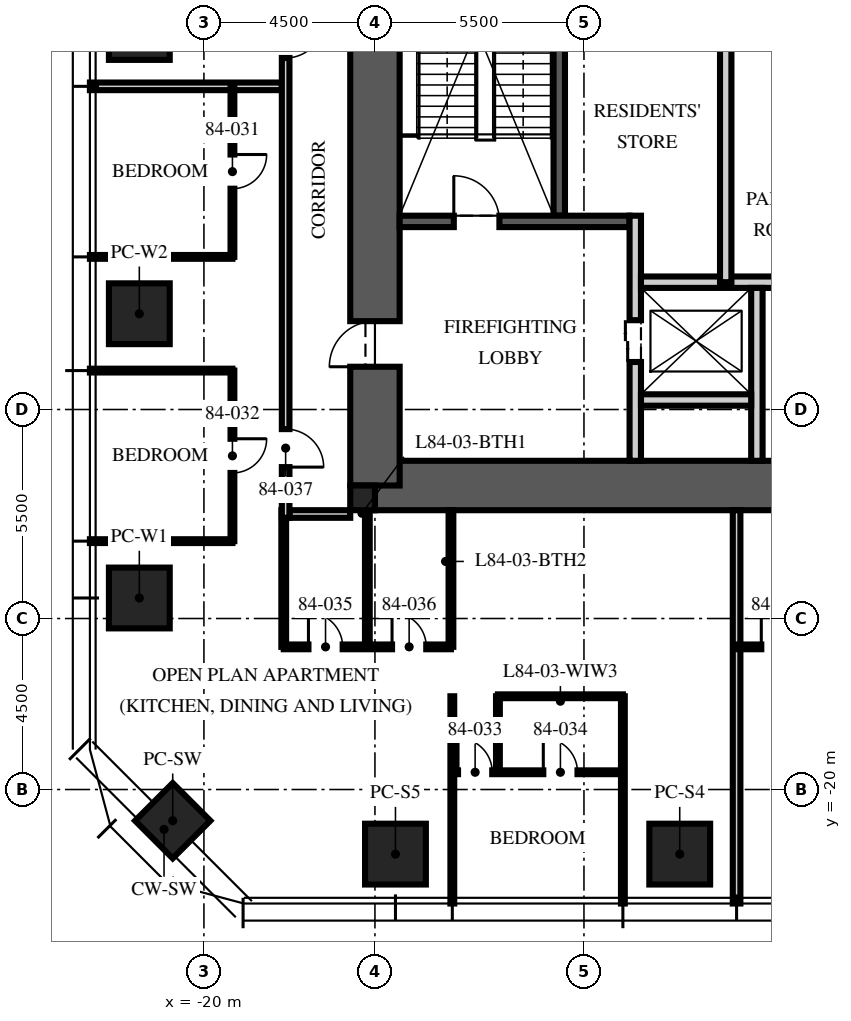
"""IFC4 building model, lengths in metres.
Left out: names, types, materials, properties, quantities, classifications, styles, units other than length and angle.
Written with IfcOpenShell. Run it as: python <this file> out.ifc"""

import sys

from ifc_helpers import new_model, si_unit, direction, frame, frame_2d, origin, origin_2d, place, context, subcontext, project, spatial, rectangle, extrude, element, fill, save


model = new_model("IFC4")
c1 = context("Model", 3, precision=1e-05, world=origin(), true_north=direction((0.0, 1.0)))
c2 = subcontext(c1, "Body", "Model", "MODEL_VIEW")
j1 = project(units=[si_unit("LENGTHUNIT", "METRE"), si_unit("PLANEANGLEUNIT", "RADIAN")], contexts=[c1])
p1 = place(None, origin())
s1 = spatial("IfcSite", under=j1, at=p1, CompositionType="ELEMENT")
p2 = place(p1, origin())
s2 = spatial("IfcBuilding", under=s1, at=p2, CompositionType="ELEMENT")
p3 = place(p2, frame((0.0, 0.0, 334.5)))
s3 = spatial("IfcBuildingStorey", under=s2, at=p3, CompositionType="ELEMENT", Elevation=334.5)
p4 = place(p3, frame((-15.5, -12.0, -0.25), z_axis=(0.0, 0.0, 1.0), x_axis=(1.0, 0.0, 0.0)))
e1 = element("IfcWall", 1, at=p4, inside=s3, PredefinedType="SHEAR", context=c2, shape_type="SweptSolid", body=[
    extrude(rectangle(XDim=31.0, YDim=1.3, at=frame_2d((15.5, 0.0))), origin(), (0.0, 0.0, 1.0), 3.75),
])
p5 = place(p3, frame((-15.5, -12.0, -0.25), z_axis=(0.0, 0.0, 1.0), x_axis=(0.0, 1.0, 0.0)))
e2 = element("IfcWall", 2, at=p5, inside=s3, PredefinedType="SHEAR", context=c2, shape_type="SweptSolid", body=[
    extrude(rectangle(XDim=24.0, YDim=1.3, at=frame_2d((12.0, 0.0))), origin(), (0.0, 0.0, 1.0), 3.75),
])
p6 = place(p5, frame((3.125, 0.0, 0.25)))
e3 = element("IfcOpeningElement", 3, at=p6, cuts=e2, PredefinedType="OPENING", context=c2, shape_type="SweptSolid", body=[
    extrude(rectangle(XDim=1.2, YDim=2.1, at=frame_2d((0.6, 1.05))), frame((0.0, 0.66, 0.0), z_axis=(0.0, -1.0, 0.0), x_axis=(1.0, 0.0, 0.0)), (0.0, 0.0, 1.0), 1.32),
])
p7 = place(p5, frame((19.375, 0.0, 0.25)))
e4 = element("IfcOpeningElement", 4, at=p7, cuts=e2, PredefinedType="OPENING", context=c2, shape_type="SweptSolid", body=[
    extrude(rectangle(XDim=1.8, YDim=2.1, at=frame_2d((0.9, 1.05))), frame((0.0, 0.66, 0.0), z_axis=(0.0, -1.0, 0.0), x_axis=(1.0, 0.0, 0.0)), (0.0, 0.0, 1.0), 1.32),
])
p8 = place(p3, frame((-15.825, -12.325, -0.25), z_axis=(0.0, 0.0, 1.0), x_axis=(1.0, 0.0, 0.0)))
e5 = element("IfcColumn", 5, at=p8, inside=s3, PredefinedType="COLUMN", context=c2, shape_type="SweptSolid", body=[
    extrude(rectangle(XDim=0.65, YDim=0.65, at=origin_2d()), origin(), (0.0, 0.0, 1.0), 3.75),
])
for number, where, z_axis, x_axis in (
    (6, (-7.48, -21.7, 0.0), (0.0, 0.0, 1.0), (1.0, 0.0, 0.0)),
    (7, (-14.96, -21.7, 0.0), (0.0, 0.0, 1.0), (1.0, 0.0, 0.0)),
    (8, (-21.7, -14.96, 0.0), (0.0, 0.0, 1.0), (0.0, 1.0, 0.0)),
    (9, (-21.7, -7.48, 0.0), (0.0, 0.0, 1.0), (0.0, 1.0, 0.0)),
    (10, (-21.7, 0.0, 0.0), (0.0, 0.0, 1.0), (0.0, 1.0, 0.0)),
):
    element("IfcColumn", number, at=place(p3, frame(where, z_axis=z_axis, x_axis=x_axis)), inside=s3, PredefinedType="COLUMN", context=c2, shape_type="SweptSolid", body=[
        extrude(rectangle(XDim=1.6, YDim=1.6, at=origin_2d()), origin(), (0.0, 0.0, 1.0), 3.75),
    ])
p9 = place(p3, frame((-20.821, -20.821, 0.0), z_axis=(0.0, 0.0, 1.0), x_axis=(0.707106781187, -0.707106781187, 0.0)))
e11 = element("IfcColumn", 11, at=p9, inside=s3, PredefinedType="COLUMN", context=c2, shape_type="SweptSolid", body=[
    extrude(rectangle(XDim=1.4, YDim=1.4, at=origin_2d()), origin(), (0.0, 0.0, 1.0), 3.75),
])
p10 = place(p3, frame((-10.65, -4.9, 0.0), z_axis=(0.0, 0.0, 1.0), x_axis=(0.0, 1.0, 0.0)))
e12 = element("IfcWall", 12, at=p10, inside=s3, PredefinedType="SOLIDWALL", context=c2, shape_type="SweptSolid", body=[
    extrude(rectangle(XDim=10.1, YDim=0.3, at=frame_2d((5.05, 0.0))), origin(), (0.0, 0.0, 1.0), 3.5),
])
p11 = place(p3, frame((-14.85, -5.05, 0.0), z_axis=(0.0, 0.0, 1.0), x_axis=(1.0, 0.0, 0.0)))
e13 = element("IfcWall", 13, at=p11, inside=s3, PredefinedType="SOLIDWALL", context=c2, shape_type="SweptSolid", body=[
    extrude(rectangle(XDim=6.05, YDim=0.3, at=frame_2d((3.025, 0.0))), origin(), (0.0, 0.0, 1.0), 3.5),
])
p12 = place(p11, frame((1.425, 0.0, 0.0)))
e14 = element("IfcOpeningElement", 14, at=p12, cuts=e13, PredefinedType="OPENING", context=c2, shape_type="SweptSolid", body=[
    extrude(rectangle(XDim=1.2, YDim=2.1, at=frame_2d((0.6, 1.05))), frame((0.0, 0.16, 0.0), z_axis=(0.0, -1.0, 0.0), x_axis=(1.0, 0.0, 0.0)), (0.0, 0.0, 1.0), 0.32),
])
p13 = place(p3, frame((-8.65, -11.35, 0.0), z_axis=(0.0, 0.0, 1.0), x_axis=(0.0, 1.0, 0.0)))
e15 = element("IfcWall", 15, at=p13, inside=s3, PredefinedType="PARTITIONING", context=c2, shape_type="SweptSolid", body=[
    extrude(rectangle(XDim=6.45, YDim=0.3, at=frame_2d((3.225, 0.0))), origin(), (0.0, 0.0, 1.0), 3.5),
])
p14 = place(p13, frame((2.6, 0.0, 0.0)))
e16 = element("IfcOpeningElement", 16, at=p14, cuts=e15, PredefinedType="OPENING", context=c2, shape_type="SweptSolid", body=[
    extrude(rectangle(XDim=1.1, YDim=2.1, at=frame_2d((0.55, 1.05))), frame((0.0, 0.16, 0.0), z_axis=(0.0, -1.0, 0.0), x_axis=(1.0, 0.0, 0.0)), (0.0, 0.0, 1.0), 0.32),
])
p15 = place(p3, frame((-8.5, -6.65, 0.0), z_axis=(0.0, 0.0, 1.0), x_axis=(1.0, 0.0, 0.0)))
e17 = element("IfcWall", 17, at=p15, inside=s3, PredefinedType="PARTITIONING", context=c2, shape_type="SweptSolid", body=[
    extrude(rectangle(XDim=17.0, YDim=0.3, at=frame_2d((8.5, 0.0))), origin(), (0.0, 0.0, 1.0), 3.5),
])
p16 = place(p15, frame((7.8, 0.0, 0.0)))
e18 = element("IfcOpeningElement", 18, at=p16, cuts=e17, PredefinedType="OPENING", context=c2, shape_type="SweptSolid", body=[
    extrude(rectangle(XDim=1.3, YDim=2.4, at=frame_2d((0.65, 1.2))), frame((0.0, 0.16, 0.0), z_axis=(0.0, -1.0, 0.0), x_axis=(1.0, 0.0, 0.0)), (0.0, 0.0, 1.0), 0.32),
])
p17 = place(p15, frame((5.65, 0.0, 0.0)))
e19 = element("IfcOpeningElement", 19, at=p17, cuts=e17, PredefinedType="OPENING", context=c2, shape_type="SweptSolid", body=[
    extrude(rectangle(XDim=0.9, YDim=2.1, at=frame_2d((0.45, 1.05))), frame((0.0, 0.16, 0.0), z_axis=(0.0, -1.0, 0.0), x_axis=(1.0, 0.0, 0.0)), (0.0, 0.0, 1.0), 0.32),
])
p18 = place(p15, frame((10.4, 0.0, 0.0)))
e20 = element("IfcOpeningElement", 20, at=p18, cuts=e17, PredefinedType="OPENING", context=c2, shape_type="SweptSolid", body=[
    extrude(rectangle(XDim=0.9, YDim=2.1, at=frame_2d((0.45, 1.05))), frame((0.0, 0.16, 0.0), z_axis=(0.0, -1.0, 0.0), x_axis=(1.0, 0.0, 0.0)), (0.0, 0.0, 1.0), 0.32),
])
p19 = place(p3, frame((-5.45, -11.35, 0.0), z_axis=(0.0, 0.0, 1.0), x_axis=(0.0, 1.0, 0.0)))
e21 = element("IfcWall", 21, at=p19, inside=s3, PredefinedType="PARTITIONING", context=c2, shape_type="SweptSolid", body=[
    extrude(rectangle(XDim=4.55, YDim=0.3, at=frame_2d((2.275, 0.0))), origin(), (0.0, 0.0, 1.0), 3.5),
])
p20 = place(p3, frame((-8.5, -9.75, 0.0), z_axis=(0.0, 0.0, 1.0), x_axis=(1.0, 0.0, 0.0)))
e22 = element("IfcWall", 22, at=p20, inside=s3, PredefinedType="PARTITIONING", context=c2, shape_type="SweptSolid", body=[
    extrude(rectangle(XDim=2.9, YDim=0.3, at=frame_2d((1.45, 0.0))), origin(), (0.0, 0.0, 1.0), 3.5),
])
p21 = place(p3, frame((-6.27, -6.65, 0.0), z_axis=(0.0, 0.0, 1.0), x_axis=(0.0, 1.0, 0.0)))
e23 = element("IfcWall", 23, at=p21, inside=s3, PredefinedType="PARTITIONING", context=c2, shape_type="SweptSolid", body=[
    extrude(rectangle(XDim=7.45, YDim=0.3, at=frame_2d((3.725, 0.0))), origin(), (0.0, 0.0, 1.0), 3.5),
])
p22 = place(p3, frame((-16.15, -12.75, 0.0), z_axis=(0.0, 0.0, 1.0), x_axis=(-1.0, 0.0, 0.0)))
e24 = element("IfcWall", 24, at=p22, inside=s3, PredefinedType="PARTITIONING", context=c2, shape_type="SweptSolid", body=[
    extrude(rectangle(XDim=1.6, YDim=0.2, at=frame_2d((0.8, 0.0))), origin(), (0.0, 0.0, 1.0), 2.6),
])
p23 = place(p3, frame((-17.95, -1.496, 0.0), z_axis=(0.0, 0.0, 1.0), x_axis=(-1.0, 0.0, 0.0)))
e25 = element("IfcWall", 25, at=p23, inside=s3, PredefinedType="PARTITIONING", context=c2, shape_type="SweptSolid", body=[
    extrude(rectangle(XDim=5.05, YDim=0.2, at=frame_2d((2.525, 0.0))), origin(), (0.0, 0.0, 1.0), 3.01),
])
for number, where, z_axis, x_axis in (
    (26, (-19.25, -5.984, 0.0), (0.0, 0.0, 1.0), (-1.0, 0.0, 0.0)),
    (27, (-19.25, -8.976, 0.0), (0.0, 0.0, 1.0), (-1.0, 0.0, 0.0)),
    (28, (-19.25, -13.464, 0.0), (0.0, 0.0, 1.0), (-1.0, 0.0, 0.0)),
):
    element("IfcWall", number, at=place(p3, frame(where, z_axis=z_axis, x_axis=x_axis)), inside=s3, PredefinedType="PARTITIONING", context=c2, shape_type="SweptSolid", body=[
        extrude(rectangle(XDim=3.75, YDim=0.1, at=frame_2d((1.875, 0.0))), origin(), (0.0, 0.0, 1.0), 3.01),
    ])
for number, where, z_axis, x_axis in (
    (29, (-13.464, -17.546, 0.0), (0.0, 0.0, 1.0), (0.0, -1.0, 0.0)),
    (30, (-8.976, -17.546, 0.0), (0.0, 0.0, 1.0), (0.0, -1.0, 0.0)),
):
    element("IfcWall", number, at=place(p3, frame(where, z_axis=z_axis, x_axis=x_axis)), inside=s3, PredefinedType="PARTITIONING", context=c2, shape_type="SweptSolid", body=[
        extrude(rectangle(XDim=5.454, YDim=0.1, at=frame_2d((2.727, 0.0))), origin(), (0.0, 0.0, 1.0), 3.01),
    ])
p24 = place(p3, frame((-5.984, -12.65, 0.0), z_axis=(0.0, 0.0, 1.0), x_axis=(0.0, -1.0, 0.0)))
e31 = element("IfcWall", 31, at=p24, inside=s3, PredefinedType="PARTITIONING", context=c2, shape_type="SweptSolid", body=[
    extrude(rectangle(XDim=10.35, YDim=0.2, at=frame_2d((5.175, 0.0))), origin(), (0.0, 0.0, 1.0), 3.01),
])
p25 = place(p3, frame((-19.25, -1.496, 0.0), z_axis=(0.0, 0.0, 1.0), x_axis=(0.0, -1.0, 0.0)))
e32 = element("IfcWall", 32, at=p25, inside=s3, PredefinedType="PARTITIONING", context=c2, shape_type="SweptSolid", body=[
    extrude(rectangle(XDim=4.488, YDim=0.1, at=frame_2d((2.244, 0.0))), origin(), (0.0, 0.0, 1.0), 2.91),
])
p26 = place(p25, frame((1.794, 0.0, 0.0)))
e33 = element("IfcOpeningElement", 33, at=p26, cuts=e32, PredefinedType="OPENING", context=c2, shape_type="SweptSolid", body=[
    extrude(rectangle(XDim=0.9, YDim=2.1, at=frame_2d((0.45, 1.05))), frame((0.0, 0.06, 0.0), z_axis=(0.0, -1.0, 0.0), x_axis=(1.0, 0.0, 0.0)), (0.0, 0.0, 1.0), 0.12),
])
p27 = place(p3, frame((-19.25, -8.976, 0.0), z_axis=(0.0, 0.0, 1.0), x_axis=(0.0, -1.0, 0.0)))
e34 = element("IfcWall", 34, at=p27, inside=s3, PredefinedType="PARTITIONING", context=c2, shape_type="SweptSolid", body=[
    extrude(rectangle(XDim=4.488, YDim=0.1, at=frame_2d((2.244, 0.0))), origin(), (0.0, 0.0, 1.0), 2.91),
])
p28 = place(p27, frame((1.794, 0.0, 0.0)))
e35 = element("IfcOpeningElement", 35, at=p28, cuts=e34, PredefinedType="OPENING", context=c2, shape_type="SweptSolid", body=[
    extrude(rectangle(XDim=0.9, YDim=2.1, at=frame_2d((0.45, 1.05))), frame((0.0, 0.06, 0.0), z_axis=(0.0, -1.0, 0.0), x_axis=(1.0, 0.0, 0.0)), (0.0, 0.0, 1.0), 0.12),
])
p29 = place(p3, frame((-13.464, -19.546, 0.0), z_axis=(0.0, 0.0, 1.0), x_axis=(1.0, 0.0, 0.0)))
e36 = element("IfcWall", 36, at=p29, inside=s3, PredefinedType="PARTITIONING", context=c2, shape_type="SweptSolid", body=[
    extrude(rectangle(XDim=4.488, YDim=0.1, at=frame_2d((2.244, 0.0))), origin(), (0.0, 0.0, 1.0), 2.91),
])
p30 = place(p29, frame((0.15, 0.0, 0.0)))
e37 = element("IfcOpeningElement", 37, at=p30, cuts=e36, PredefinedType="OPENING", context=c2, shape_type="SweptSolid", body=[
    extrude(rectangle(XDim=0.9, YDim=2.1, at=frame_2d((0.45, 1.05))), frame((0.0, 0.06, 0.0), z_axis=(0.0, -1.0, 0.0), x_axis=(1.0, 0.0, 0.0)), (0.0, 0.0, 1.0), 0.12),
])
p31 = place(p29, frame((2.394, 0.0, 0.0)))
e38 = element("IfcOpeningElement", 38, at=p31, cuts=e36, PredefinedType="OPENING", context=c2, shape_type="SweptSolid", body=[
    extrude(rectangle(XDim=0.9, YDim=2.1, at=frame_2d((0.45, 1.05))), frame((0.0, 0.06, 0.0), z_axis=(0.0, -1.0, 0.0), x_axis=(1.0, 0.0, 0.0)), (0.0, 0.0, 1.0), 0.12),
])
p32 = place(p3, frame((-12.264, -17.546, 0.0), z_axis=(0.0, 0.0, 1.0), x_axis=(0.0, -1.0, 0.0)))
e39 = element("IfcWall", 39, at=p32, inside=s3, PredefinedType="PARTITIONING", context=c2, shape_type="SweptSolid", body=[
    extrude(rectangle(XDim=2.0, YDim=0.1, at=frame_2d((1.0, 0.0))), origin(), (0.0, 0.0, 1.0), 3.5),
])
p33 = place(p3, frame((-12.264, -17.546, 0.0), z_axis=(0.0, 0.0, 1.0), x_axis=(1.0, 0.0, 0.0)))
e40 = element("IfcWall", 40, at=p33, inside=s3, PredefinedType="PARTITIONING", context=c2, shape_type="SweptSolid", body=[
    extrude(rectangle(XDim=3.288, YDim=0.1, at=frame_2d((1.644, 0.0))), origin(), (0.0, 0.0, 1.0), 2.91),
])
p34 = place(p3, frame((-17.9, -16.246, 0.0), z_axis=(0.0, 0.0, 1.0), x_axis=(1.0, 0.0, 0.0)))
e41 = element("IfcWall", 41, at=p34, inside=s3, PredefinedType="PARTITIONING", context=c2, shape_type="SweptSolid", body=[
    extrude(rectangle(XDim=4.4, YDim=0.125, at=frame_2d((2.2, 0.0))), origin(), (0.0, 0.0, 1.0), 2.6),
])
p35 = place(p34, frame((0.65, 0.0, 0.0)))
e42 = element("IfcOpeningElement", 42, at=p35, cuts=e41, PredefinedType="OPENING", context=c2, shape_type="SweptSolid", body=[
    extrude(rectangle(XDim=0.9, YDim=2.1, at=frame_2d((0.45, 1.05))), frame((0.0, 0.073, 0.0), z_axis=(0.0, -1.0, 0.0), x_axis=(1.0, 0.0, 0.0)), (0.0, 0.0, 1.0), 0.145),
])
p36 = place(p34, frame((2.85, 0.0, 0.0)))
e43 = element("IfcOpeningElement", 43, at=p36, cuts=e41, PredefinedType="OPENING", context=c2, shape_type="SweptSolid", body=[
    extrude(rectangle(XDim=0.9, YDim=2.1, at=frame_2d((0.45, 1.05))), frame((0.0, 0.073, 0.0), z_axis=(0.0, -1.0, 0.0), x_axis=(1.0, 0.0, 0.0)), (0.0, 0.0, 1.0), 0.145),
])
for number, where, z_axis, x_axis in (
    (44, (-17.9, -12.65, 0.0), (0.0, 0.0, 1.0), (0.0, -1.0, 0.0)),
    (45, (-15.7, -12.65, 0.0), (0.0, 0.0, 1.0), (0.0, -1.0, 0.0)),
):
    element("IfcWall", number, at=place(p3, frame(where, z_axis=z_axis, x_axis=x_axis)), inside=s3, PredefinedType="PARTITIONING", context=c2, shape_type="SweptSolid", body=[
        extrude(rectangle(XDim=3.596, YDim=0.125, at=frame_2d((1.798, 0.0))), origin(), (0.0, 0.0, 1.0), 2.6),
    ])
p37 = place(p3, frame((-13.5, -12.65, 0.0), z_axis=(0.0, 0.0, 1.0), x_axis=(0.0, -1.0, 0.0)))
e46 = element("IfcWall", 46, at=p37, inside=s3, PredefinedType="PARTITIONING", context=c2, shape_type="SweptSolid", body=[
    extrude(rectangle(XDim=3.596, YDim=0.125, at=frame_2d((1.798, 0.0))), origin(), (0.0, 0.0, 1.0), 3.5),
])
p38 = place(p3, frame((-5.984, -16.246, 0.0), z_axis=(0.0, 0.0, 1.0), x_axis=(1.0, 0.0, 0.0)))
e47 = element("IfcWall", 47, at=p38, inside=s3, PredefinedType="PARTITIONING", context=c2, shape_type="SweptSolid", body=[
    extrude(rectangle(XDim=2.2, YDim=0.125, at=frame_2d((1.1, 0.0))), origin(), (0.0, 0.0, 1.0), 2.91),
])
p39 = place(p38, frame((0.65, 0.0, 0.0)))
e48 = element("IfcOpeningElement", 48, at=p39, cuts=e47, PredefinedType="OPENING", context=c2, shape_type="SweptSolid", body=[
    extrude(rectangle(XDim=0.9, YDim=2.1, at=frame_2d((0.45, 1.05))), frame((0.0, 0.073, 0.0), z_axis=(0.0, -1.0, 0.0), x_axis=(1.0, 0.0, 0.0)), (0.0, 0.0, 1.0), 0.145),
])
p40 = place(p3, frame((-17.85, 12.85, 0.0), z_axis=(0.0, 0.0, 1.0), x_axis=(0.0, -1.0, 0.0)))
e49 = element("IfcWall", 49, at=p40, inside=s3, PredefinedType="PARTITIONING", context=c2, shape_type="SweptSolid", body=[
    extrude(rectangle(XDim=25.7, YDim=0.2, at=frame_2d((12.85, 0.0))), origin(), (0.0, 0.0, 1.0), 2.9),
])
p41 = place(p40, frame((12.6, 0.0, 0.0)))
e50 = element("IfcOpeningElement", 50, at=p41, cuts=e49, PredefinedType="OPENING", context=c2, shape_type="SweptSolid", body=[
    extrude(rectangle(XDim=1.0, YDim=2.2, at=frame_2d((0.5, 1.1))), frame((0.0, 0.11, 0.0), z_axis=(0.0, -1.0, 0.0), x_axis=(1.0, 0.0, 0.0)), (0.0, 0.0, 1.0), 0.22),
])
p42 = place(p40, frame((23.366, 0.0, 0.0)))
e51 = element("IfcOpeningElement", 51, at=p42, cuts=e49, PredefinedType="OPENING", context=c2, shape_type="SweptSolid", body=[
    extrude(rectangle(XDim=1.0, YDim=2.2, at=frame_2d((0.5, 1.1))), frame((0.0, 0.11, 0.0), z_axis=(0.0, -1.0, 0.0), x_axis=(1.0, 0.0, 0.0)), (0.0, 0.0, 1.0), 0.22),
])
p43 = place(p12, origin())
e52 = element("IfcDoor", 52, at=p43, inside=s3, OperationType="SINGLE_SWING_LEFT", PredefinedType="DOOR", context=c2, shape_type="SweptSolid", body=[
    extrude(rectangle(XDim=1.2, YDim=2.1, at=frame_2d((0.6, 1.05))), frame((0.0, 0.025, 0.0), z_axis=(0.0, -1.0, 0.0), x_axis=(1.0, 0.0, 0.0)), (0.0, 0.0, 1.0), 0.05),
])
fill(e14, e52)
p44 = place(p6, origin())
e53 = element("IfcDoor", 53, at=p44, inside=s3, OperationType="SINGLE_SWING_LEFT", PredefinedType="DOOR", context=c2, shape_type="SweptSolid", body=[
    extrude(rectangle(XDim=1.2, YDim=2.1, at=frame_2d((0.6, 1.05))), frame((0.0, 0.025, 0.0), z_axis=(0.0, -1.0, 0.0), x_axis=(1.0, 0.0, 0.0)), (0.0, 0.0, 1.0), 0.05),
])
fill(e3, e53)
p45 = place(p14, origin())
e54 = element("IfcDoor", 54, at=p45, inside=s3, OperationType="DOUBLE_DOOR_SLIDING", PredefinedType="DOOR", context=c2, shape_type="SweptSolid", body=[
    extrude(rectangle(XDim=1.1, YDim=2.1, at=frame_2d((0.55, 1.05))), frame((0.0, 0.025, 0.0), z_axis=(0.0, -1.0, 0.0), x_axis=(1.0, 0.0, 0.0)), (0.0, 0.0, 1.0), 0.05),
])
fill(e16, e54)
p46 = place(p41, origin())
e55 = element("IfcDoor", 55, at=p46, inside=s3, OperationType="SINGLE_SWING_LEFT", PredefinedType="DOOR", context=c2, shape_type="SweptSolid", body=[
    extrude(rectangle(XDim=1.0, YDim=2.2, at=frame_2d((0.5, 1.1))), frame((0.0, 0.025, 0.0), z_axis=(0.0, -1.0, 0.0), x_axis=(1.0, 0.0, 0.0)), (0.0, 0.0, 1.0), 0.05),
])
fill(e50, e55)
p47 = place(p26, origin())
e56 = element("IfcDoor", 56, at=p47, inside=s3, OperationType="SINGLE_SWING_LEFT", PredefinedType="DOOR", context=c2, shape_type="SweptSolid", body=[
    extrude(rectangle(XDim=0.9, YDim=2.1, at=frame_2d((0.45, 1.05))), frame((0.0, 0.025, 0.0), z_axis=(0.0, -1.0, 0.0), x_axis=(1.0, 0.0, 0.0)), (0.0, 0.0, 1.0), 0.05),
])
fill(e33, e56)
p48 = place(p28, origin())
e57 = element("IfcDoor", 57, at=p48, inside=s3, OperationType="SINGLE_SWING_LEFT", PredefinedType="DOOR", context=c2, shape_type="SweptSolid", body=[
    extrude(rectangle(XDim=0.9, YDim=2.1, at=frame_2d((0.45, 1.05))), frame((0.0, 0.025, 0.0), z_axis=(0.0, -1.0, 0.0), x_axis=(1.0, 0.0, 0.0)), (0.0, 0.0, 1.0), 0.05),
])
fill(e35, e57)
p49 = place(p30, origin())
e58 = element("IfcDoor", 58, at=p49, inside=s3, OperationType="SINGLE_SWING_LEFT", PredefinedType="DOOR", context=c2, shape_type="SweptSolid", body=[
    extrude(rectangle(XDim=0.9, YDim=2.1, at=frame_2d((0.45, 1.05))), frame((0.0, 0.025, 0.0), z_axis=(0.0, -1.0, 0.0), x_axis=(1.0, 0.0, 0.0)), (0.0, 0.0, 1.0), 0.05),
])
fill(e37, e58)
p50 = place(p31, origin())
e59 = element("IfcDoor", 59, at=p50, inside=s3, OperationType="SINGLE_SWING_LEFT", PredefinedType="DOOR", context=c2, shape_type="SweptSolid", body=[
    extrude(rectangle(XDim=0.9, YDim=2.1, at=frame_2d((0.45, 1.05))), frame((0.0, 0.025, 0.0), z_axis=(0.0, -1.0, 0.0), x_axis=(1.0, 0.0, 0.0)), (0.0, 0.0, 1.0), 0.05),
])
fill(e38, e59)
p51 = place(p35, origin())
e60 = element("IfcDoor", 60, at=p51, inside=s3, OperationType="SINGLE_SWING_LEFT", PredefinedType="DOOR", context=c2, shape_type="SweptSolid", body=[
    extrude(rectangle(XDim=0.9, YDim=2.1, at=frame_2d((0.45, 1.05))), frame((0.0, 0.025, 0.0), z_axis=(0.0, -1.0, 0.0), x_axis=(1.0, 0.0, 0.0)), (0.0, 0.0, 1.0), 0.05),
])
fill(e42, e60)
p52 = place(p36, origin())
e61 = element("IfcDoor", 61, at=p52, inside=s3, OperationType="SINGLE_SWING_LEFT", PredefinedType="DOOR", context=c2, shape_type="SweptSolid", body=[
    extrude(rectangle(XDim=0.9, YDim=2.1, at=frame_2d((0.45, 1.05))), frame((0.0, 0.025, 0.0), z_axis=(0.0, -1.0, 0.0), x_axis=(1.0, 0.0, 0.0)), (0.0, 0.0, 1.0), 0.05),
])
fill(e43, e61)
p53 = place(p42, origin())
e62 = element("IfcDoor", 62, at=p53, inside=s3, OperationType="SINGLE_SWING_RIGHT", PredefinedType="DOOR", context=c2, shape_type="SweptSolid", body=[
    extrude(rectangle(XDim=1.0, YDim=2.2, at=frame_2d((0.5, 1.1))), frame((0.0, 0.025, 0.0), z_axis=(0.0, -1.0, 0.0), x_axis=(1.0, 0.0, 0.0)), (0.0, 0.0, 1.0), 0.05),
])
fill(e51, e62)
p54 = place(p39, origin())
e63 = element("IfcDoor", 63, at=p54, inside=s3, OperationType="SINGLE_SWING_LEFT", PredefinedType="DOOR", context=c2, shape_type="SweptSolid", body=[
    extrude(rectangle(XDim=0.9, YDim=2.1, at=frame_2d((0.45, 1.05))), frame((0.0, 0.025, 0.0), z_axis=(0.0, -1.0, 0.0), x_axis=(1.0, 0.0, 0.0)), (0.0, 0.0, 1.0), 0.05),
])
fill(e48, e63)
save(model, sys.argv[1])
